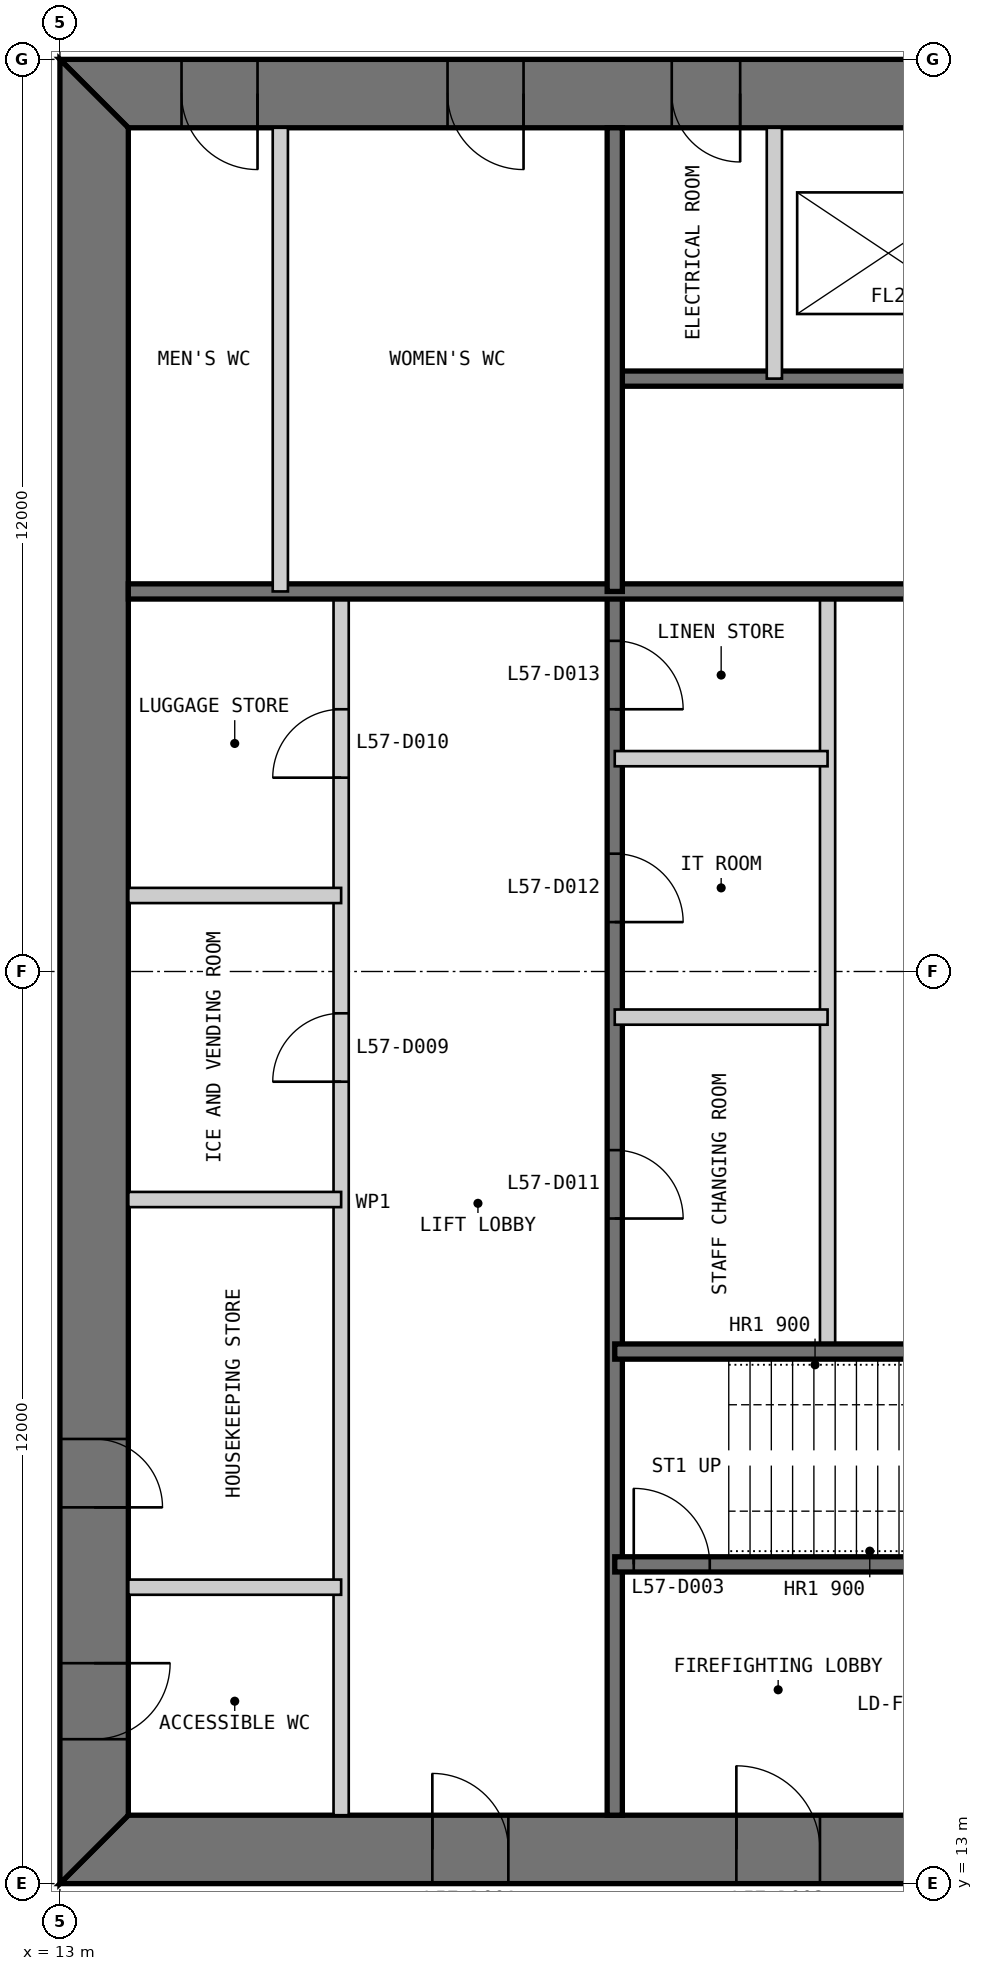
"""IFC4 building model, lengths in metres.
Left out: names, types, materials, properties, quantities, classifications, styles, units other than length and angle.
Written with IfcOpenShell. Run it as: python <this file> out.ifc"""

import sys

from ifc_helpers import new_model, si_unit, direction, frame, frame_2d, origin, place, context, subcontext, project, spatial, polyline, rectangle, outline, extrude, element, fill, save


model = new_model("IFC4")
c1 = context("Model", 3, precision=1e-05, world=origin(), true_north=direction((0.0, 1.0)))
c2 = subcontext(c1, "Body", "Model", "MODEL_VIEW")
j1 = project(units=[si_unit("LENGTHUNIT", "METRE"), si_unit("PLANEANGLEUNIT", "RADIAN")], contexts=[c1])
p1 = place(None, origin())
s1 = spatial("IfcSite", under=j1, at=p1, CompositionType="ELEMENT")
p2 = place(p1, origin())
s2 = spatial("IfcBuilding", under=s1, at=p2, CompositionType="ELEMENT")
p3 = place(p2, frame((0.0, 0.0, 245.8)))
s3 = spatial("IfcBuildingStorey", under=s2, at=p3, CompositionType="ELEMENT", Elevation=245.8)
p4 = place(p3, frame((13.0, 13.45, 0.0), z_axis=(0.0, 0.0, 1.0), x_axis=(1.0, 0.0, 0.0)))
e1 = element("IfcWall", 1, at=p4, inside=s3, PredefinedType="SHEAR", context=c2, shape_type="SweptSolid", body=[
    extrude(outline(polyline([(0.0, -0.45), (24.0, -0.45), (23.1, 0.45), (0.9, 0.45), (0.0, -0.45)])), origin(), (0.0, 0.0, 1.0), 3.4),
])
p5 = place(p4, frame((4.9, 0.0, 0.0)))
e2 = element("IfcOpeningElement", 2, at=p5, cuts=e1, PredefinedType="OPENING", context=c2, shape_type="SweptSolid", body=[
    extrude(rectangle(XDim=1.0, YDim=2.2, at=frame_2d((0.5, 1.1))), frame((0.0, 0.46, 0.0), z_axis=(0.0, -1.0, 0.0), x_axis=(1.0, 0.0, 0.0)), (0.0, 0.0, 1.0), 0.92),
])
p6 = place(p4, frame((8.9, 0.0, 0.0)))
e3 = element("IfcOpeningElement", 3, at=p6, cuts=e1, PredefinedType="OPENING", context=c2, shape_type="SweptSolid", body=[
    extrude(rectangle(XDim=1.1, YDim=2.2, at=frame_2d((0.55, 1.1))), frame((0.0, 0.46, 0.0), z_axis=(0.0, -1.0, 0.0), x_axis=(1.0, 0.0, 0.0)), (0.0, 0.0, 1.0), 0.92),
])
p7 = place(p4, frame((15.05, 0.0, 0.0)))
e4 = element("IfcOpeningElement", 4, at=p7, cuts=e1, PredefinedType="OPENING", context=c2, shape_type="SweptSolid", body=[
    extrude(rectangle(XDim=0.9, YDim=2.2, at=frame_2d((0.45, 1.1))), frame((0.0, 0.46, 0.0), z_axis=(0.0, -1.0, 0.0), x_axis=(1.0, 0.0, 0.0)), (0.0, 0.0, 1.0), 0.92),
])
p8 = place(p4, frame((17.9, 0.0, 0.0)))
e5 = element("IfcOpeningElement", 5, at=p8, cuts=e1, PredefinedType="OPENING", context=c2, shape_type="SweptSolid", body=[
    extrude(rectangle(XDim=1.0, YDim=2.2, at=frame_2d((0.5, 1.1))), frame((0.0, 0.46, 0.0), z_axis=(0.0, -1.0, 0.0), x_axis=(1.0, 0.0, 0.0)), (0.0, 0.0, 1.0), 0.92),
])
p9 = place(p4, frame((21.4, 0.0, 0.0)))
e6 = element("IfcOpeningElement", 6, at=p9, cuts=e1, PredefinedType="OPENING", context=c2, shape_type="SweptSolid", body=[
    extrude(rectangle(XDim=1.0, YDim=2.2, at=frame_2d((0.5, 1.1))), frame((0.0, 0.46, 0.0), z_axis=(0.0, -1.0, 0.0), x_axis=(1.0, 0.0, 0.0)), (0.0, 0.0, 1.0), 0.92),
])
p10 = place(p3, frame((37.0, 36.55, 0.0), z_axis=(0.0, 0.0, 1.0), x_axis=(-1.0, 0.0, 0.0)))
e7 = element("IfcWall", 7, at=p10, inside=s3, PredefinedType="SHEAR", context=c2, shape_type="SweptSolid", body=[
    extrude(outline(polyline([(0.0, -0.45), (24.0, -0.45), (23.1, 0.45), (0.9, 0.45), (0.0, -0.45)])), origin(), (0.0, 0.0, 1.0), 3.4),
])
p11 = place(p10, frame((4.9, 0.0, 0.0)))
e8 = element("IfcOpeningElement", 8, at=p11, cuts=e7, PredefinedType="OPENING", context=c2, shape_type="SweptSolid", body=[
    extrude(rectangle(XDim=1.0, YDim=2.2, at=frame_2d((0.5, 1.1))), frame((0.0, 0.46, 0.0), z_axis=(0.0, -1.0, 0.0), x_axis=(1.0, 0.0, 0.0)), (0.0, 0.0, 1.0), 0.92),
])
p12 = place(p10, frame((8.9, 0.0, 0.0)))
e9 = element("IfcOpeningElement", 9, at=p12, cuts=e7, PredefinedType="OPENING", context=c2, shape_type="SweptSolid", body=[
    extrude(rectangle(XDim=1.1, YDim=2.2, at=frame_2d((0.55, 1.1))), frame((0.0, 0.46, 0.0), z_axis=(0.0, -1.0, 0.0), x_axis=(1.0, 0.0, 0.0)), (0.0, 0.0, 1.0), 0.92),
])
p13 = place(p10, frame((15.05, 0.0, 0.0)))
e10 = element("IfcOpeningElement", 10, at=p13, cuts=e7, PredefinedType="OPENING", context=c2, shape_type="SweptSolid", body=[
    extrude(rectangle(XDim=0.9, YDim=2.2, at=frame_2d((0.45, 1.1))), frame((0.0, 0.46, 0.0), z_axis=(0.0, -1.0, 0.0), x_axis=(1.0, 0.0, 0.0)), (0.0, 0.0, 1.0), 0.92),
])
p14 = place(p10, frame((17.9, 0.0, 0.0)))
e11 = element("IfcOpeningElement", 11, at=p14, cuts=e7, PredefinedType="OPENING", context=c2, shape_type="SweptSolid", body=[
    extrude(rectangle(XDim=1.0, YDim=2.2, at=frame_2d((0.5, 1.1))), frame((0.0, 0.46, 0.0), z_axis=(0.0, -1.0, 0.0), x_axis=(1.0, 0.0, 0.0)), (0.0, 0.0, 1.0), 0.92),
])
p15 = place(p10, frame((21.4, 0.0, 0.0)))
e12 = element("IfcOpeningElement", 12, at=p15, cuts=e7, PredefinedType="OPENING", context=c2, shape_type="SweptSolid", body=[
    extrude(rectangle(XDim=1.0, YDim=2.2, at=frame_2d((0.5, 1.1))), frame((0.0, 0.46, 0.0), z_axis=(0.0, -1.0, 0.0), x_axis=(1.0, 0.0, 0.0)), (0.0, 0.0, 1.0), 0.92),
])
p16 = place(p3, frame((13.45, 36.1, 0.0), z_axis=(0.0, 0.0, 1.0), x_axis=(0.0, -1.0, 0.0)))
e13 = element("IfcWall", 13, at=p16, inside=s3, PredefinedType="SHEAR", context=c2, shape_type="SweptSolid", body=[
    extrude(outline(polyline([(-0.9, -0.45), (23.1, -0.45), (22.2, 0.45), (0.0, 0.45), (-0.9, -0.45)])), origin(), (0.0, 0.0, 1.0), 3.4),
])
p17 = place(p16, frame((20.2, 0.0, 0.0)))
e14 = element("IfcOpeningElement", 14, at=p17, cuts=e13, PredefinedType="OPENING", context=c2, shape_type="SweptSolid", body=[
    extrude(rectangle(XDim=1.0, YDim=2.2, at=frame_2d((0.5, 1.1))), frame((0.0, 0.46, 0.0), z_axis=(0.0, -1.0, 0.0), x_axis=(1.0, 0.0, 0.0)), (0.0, 0.0, 1.0), 0.92),
])
p18 = place(p16, frame((17.25, 0.0, 0.0)))
e15 = element("IfcOpeningElement", 15, at=p18, cuts=e13, PredefinedType="OPENING", context=c2, shape_type="SweptSolid", body=[
    extrude(rectangle(XDim=0.9, YDim=2.2, at=frame_2d((0.45, 1.1))), frame((0.0, 0.46, 0.0), z_axis=(0.0, -1.0, 0.0), x_axis=(1.0, 0.0, 0.0)), (0.0, 0.0, 1.0), 0.92),
])
p19 = place(p3, frame((16.7, 13.9, 0.0), z_axis=(0.0, 0.0, 1.0), x_axis=(0.0, 1.0, 0.0)))
e16 = element("IfcWall", 16, at=p19, inside=s3, PredefinedType="PARTITIONING", context=c2, shape_type="SweptSolid", body=[
    extrude(rectangle(XDim=16.1, YDim=0.2, at=frame_2d((8.05, 0.0))), origin(), (0.0, 0.0, 1.0), 3.2),
])
p20 = place(p19, frame((9.65, 0.0, 0.0)))
e17 = element("IfcOpeningElement", 17, at=p20, cuts=e16, PredefinedType="OPENING", context=c2, shape_type="SweptSolid", body=[
    extrude(rectangle(XDim=0.9, YDim=2.2, at=frame_2d((0.45, 1.1))), frame((0.0, 0.11, 0.0), z_axis=(0.0, -1.0, 0.0), x_axis=(1.0, 0.0, 0.0)), (0.0, 0.0, 1.0), 0.22),
])
p21 = place(p19, frame((13.65, 0.0, 0.0)))
e18 = element("IfcOpeningElement", 18, at=p21, cuts=e16, PredefinedType="OPENING", context=c2, shape_type="SweptSolid", body=[
    extrude(rectangle(XDim=0.9, YDim=2.2, at=frame_2d((0.45, 1.1))), frame((0.0, 0.11, 0.0), z_axis=(0.0, -1.0, 0.0), x_axis=(1.0, 0.0, 0.0)), (0.0, 0.0, 1.0), 0.22),
])
p22 = place(p3, frame((20.3, 13.9, 0.0), z_axis=(0.0, 0.0, 1.0), x_axis=(0.0, 1.0, 0.0)))
e19 = element("IfcWall", 19, at=p22, inside=s3, PredefinedType="SOLIDWALL", context=c2, shape_type="SweptSolid", body=[
    extrude(rectangle(XDim=16.1, YDim=0.2, at=frame_2d((8.05, 0.0))), origin(), (0.0, 0.0, 1.0), 3.2),
])
p23 = place(p22, frame((7.85, 0.0, 0.0)))
e20 = element("IfcOpeningElement", 20, at=p23, cuts=e19, PredefinedType="OPENING", context=c2, shape_type="SweptSolid", body=[
    extrude(rectangle(XDim=0.9, YDim=2.2, at=frame_2d((0.45, 1.1))), frame((0.0, 0.11, 0.0), z_axis=(0.0, -1.0, 0.0), x_axis=(1.0, 0.0, 0.0)), (0.0, 0.0, 1.0), 0.22),
])
p24 = place(p22, frame((11.75, 0.0, 0.0)))
e21 = element("IfcOpeningElement", 21, at=p24, cuts=e19, PredefinedType="OPENING", context=c2, shape_type="SweptSolid", body=[
    extrude(rectangle(XDim=0.9, YDim=2.2, at=frame_2d((0.45, 1.1))), frame((0.0, 0.11, 0.0), z_axis=(0.0, -1.0, 0.0), x_axis=(1.0, 0.0, 0.0)), (0.0, 0.0, 1.0), 0.22),
])
p25 = place(p22, frame((14.55, 0.0, 0.0)))
e22 = element("IfcOpeningElement", 22, at=p25, cuts=e19, PredefinedType="OPENING", context=c2, shape_type="SweptSolid", body=[
    extrude(rectangle(XDim=0.9, YDim=2.2, at=frame_2d((0.45, 1.1))), frame((0.0, 0.11, 0.0), z_axis=(0.0, -1.0, 0.0), x_axis=(1.0, 0.0, 0.0)), (0.0, 0.0, 1.0), 0.22),
])
p26 = place(p3, frame((23.1, 20.0, 0.0), z_axis=(0.0, 0.0, 1.0), x_axis=(0.0, 1.0, 0.0)))
e23 = element("IfcWall", 23, at=p26, inside=s3, PredefinedType="PARTITIONING", context=c2, shape_type="SweptSolid", body=[
    extrude(rectangle(XDim=10.0, YDim=0.2, at=frame_2d((5.0, 0.0))), origin(), (0.0, 0.0, 1.0), 3.2),
])
p27 = place(p3, frame((20.3, 17.2, 0.0), z_axis=(0.0, 0.0, 1.0), x_axis=(1.0, 0.0, 0.0)))
e24 = element("IfcWall", 24, at=p27, inside=s3, PredefinedType="SOLIDWALL", context=c2, shape_type="SweptSolid", body=[
    extrude(rectangle(XDim=9.4, YDim=0.2, at=frame_2d((4.7, 0.0))), origin(), (0.0, 0.0, 1.0), 3.2),
])
p28 = place(p27, frame((0.25, 0.0, 0.0)))
e25 = element("IfcOpeningElement", 25, at=p28, cuts=e24, PredefinedType="OPENING", context=c2, shape_type="SweptSolid", body=[
    extrude(rectangle(XDim=1.0, YDim=2.2, at=frame_2d((0.5, 1.1))), frame((0.0, 0.11, 0.0), z_axis=(0.0, -1.0, 0.0), x_axis=(1.0, 0.0, 0.0)), (0.0, 0.0, 1.0), 0.22),
])
p29 = place(p3, frame((20.3, 20.0, 0.0), z_axis=(0.0, 0.0, 1.0), x_axis=(1.0, 0.0, 0.0)))
e26 = element("IfcWall", 26, at=p29, inside=s3, PredefinedType="SOLIDWALL", context=c2, shape_type="SweptSolid", body=[
    extrude(rectangle(XDim=15.8, YDim=0.2, at=frame_2d((7.9, 0.0))), origin(), (0.0, 0.0, 1.0), 3.2),
])
for number, where, z_axis, x_axis in (
    (27, (13.9, 16.9, 0.0), (0.0, 0.0, 1.0), (1.0, 0.0, 0.0)),
    (28, (13.9, 22.0, 0.0), (0.0, 0.0, 1.0), (1.0, 0.0, 0.0)),
    (29, (13.9, 26.0, 0.0), (0.0, 0.0, 1.0), (1.0, 0.0, 0.0)),
    (30, (20.3, 24.4, 0.0), (0.0, 0.0, 1.0), (1.0, 0.0, 0.0)),
    (31, (20.3, 27.8, 0.0), (0.0, 0.0, 1.0), (1.0, 0.0, 0.0)),
):
    element("IfcWall", number, at=place(p3, frame(where, z_axis=z_axis, x_axis=x_axis)), inside=s3, PredefinedType="PARTITIONING", context=c2, shape_type="SweptSolid", body=[
        extrude(rectangle(XDim=2.8, YDim=0.2, at=frame_2d((1.4, 0.0))), origin(), (0.0, 0.0, 1.0), 3.2),
    ])
p30 = place(p3, frame((29.7, 32.8, 0.0), z_axis=(0.0, 0.0, 1.0), x_axis=(-1.0, 0.0, 0.0)))
e32 = element("IfcWall", 32, at=p30, inside=s3, PredefinedType="SOLIDWALL", context=c2, shape_type="SweptSolid", body=[
    extrude(rectangle(XDim=9.4, YDim=0.2, at=frame_2d((4.7, 0.0))), origin(), (0.0, 0.0, 1.0), 3.2),
])
p31 = place(p30, frame((0.25, 0.0, 0.0)))
e33 = element("IfcOpeningElement", 33, at=p31, cuts=e32, PredefinedType="OPENING", context=c2, shape_type="SweptSolid", body=[
    extrude(rectangle(XDim=1.0, YDim=2.2, at=frame_2d((0.5, 1.1))), frame((0.0, 0.11, 0.0), z_axis=(0.0, -1.0, 0.0), x_axis=(1.0, 0.0, 0.0)), (0.0, 0.0, 1.0), 0.22),
])
p32 = place(p3, frame((29.7, 30.0, 0.0), z_axis=(0.0, 0.0, 1.0), x_axis=(-1.0, 0.0, 0.0)))
e34 = element("IfcWall", 34, at=p32, inside=s3, PredefinedType="SOLIDWALL", context=c2, shape_type="SweptSolid", body=[
    extrude(rectangle(XDim=15.8, YDim=0.2, at=frame_2d((7.9, 0.0))), origin(), (0.0, 0.0, 1.0), 3.2),
])
p33 = place(p3, frame((22.4, 36.1, 0.0), z_axis=(0.0, 0.0, 1.0), x_axis=(0.0, -1.0, 0.0)))
e35 = element("IfcWall", 35, at=p33, inside=s3, PredefinedType="PARTITIONING", context=c2, shape_type="SweptSolid", body=[
    extrude(rectangle(XDim=3.3, YDim=0.2, at=frame_2d((1.65, 0.0))), origin(), (0.0, 0.0, 1.0), 3.2),
])
p34 = place(p3, frame((20.3, 36.1, 0.0), z_axis=(0.0, 0.0, 1.0), x_axis=(0.0, -1.0, 0.0)))
e36 = element("IfcWall", 36, at=p34, inside=s3, PredefinedType="SOLIDWALL", context=c2, shape_type="SweptSolid", body=[
    extrude(rectangle(XDim=6.1, YDim=0.2, at=frame_2d((3.05, 0.0))), origin(), (0.0, 0.0, 1.0), 3.2),
])
p35 = place(p3, frame((15.9, 36.1, 0.0), z_axis=(0.0, 0.0, 1.0), x_axis=(0.0, -1.0, 0.0)))
e37 = element("IfcWall", 37, at=p35, inside=s3, PredefinedType="PARTITIONING", context=c2, shape_type="SweptSolid", body=[
    extrude(rectangle(XDim=6.1, YDim=0.2, at=frame_2d((3.05, 0.0))), origin(), (0.0, 0.0, 1.0), 3.2),
])
p36 = place(p5, origin())
e38 = element("IfcDoor", 38, at=p36, inside=s3, OperationType="SINGLE_SWING_LEFT", PredefinedType="DOOR", context=c2, shape_type="SweptSolid", body=[
    extrude(rectangle(XDim=1.0, YDim=2.2, at=frame_2d((0.5, 1.1))), frame((0.0, 0.025, 0.0), z_axis=(0.0, -1.0, 0.0), x_axis=(1.0, 0.0, 0.0)), (0.0, 0.0, 1.0), 0.05),
    extrude(outline(polyline([(0.0, 0.0), (0.04, 0.0), (0.04, 2.16), (0.96, 2.16), (0.96, 0.0), (1.0, 0.0), (1.0, 2.2), (0.0, 2.2), (0.0, 0.0)])), frame((0.0, 0.3, 0.0), z_axis=(0.0, -1.0, 0.0), x_axis=(1.0, 0.0, 0.0)), (0.0, 0.0, 1.0), 0.6),
])
fill(e2, e38)
p37 = place(p6, origin())
e39 = element("IfcDoor", 39, at=p37, inside=s3, OperationType="SINGLE_SWING_LEFT", PredefinedType="DOOR", context=c2, shape_type="SweptSolid", body=[
    extrude(rectangle(XDim=1.1, YDim=2.2, at=frame_2d((0.55, 1.1))), frame((0.0, 0.025, 0.0), z_axis=(0.0, -1.0, 0.0), x_axis=(1.0, 0.0, 0.0)), (0.0, 0.0, 1.0), 0.05),
    extrude(outline(polyline([(0.0, 0.0), (0.04, 0.0), (0.04, 2.16), (1.06, 2.16), (1.06, 0.0), (1.1, 0.0), (1.1, 2.2), (0.0, 2.2), (0.0, 0.0)])), frame((0.0, 0.3, 0.0), z_axis=(0.0, -1.0, 0.0), x_axis=(1.0, 0.0, 0.0)), (0.0, 0.0, 1.0), 0.6),
])
fill(e3, e39)
p38 = place(p28, origin())
e40 = element("IfcDoor", 40, at=p38, inside=s3, OperationType="SINGLE_SWING_LEFT", PredefinedType="DOOR", context=c2, shape_type="SweptSolid", body=[
    extrude(rectangle(XDim=1.0, YDim=2.2, at=frame_2d((0.5, 1.1))), frame((0.0, 0.025, 0.0), z_axis=(0.0, -1.0, 0.0), x_axis=(1.0, 0.0, 0.0)), (0.0, 0.0, 1.0), 0.05),
])
fill(e25, e40)
p39 = place(p17, origin())
e41 = element("IfcDoor", 41, at=p39, inside=s3, OperationType="SINGLE_SWING_LEFT", PredefinedType="DOOR", context=c2, shape_type="SweptSolid", body=[
    extrude(rectangle(XDim=1.0, YDim=2.2, at=frame_2d((0.5, 1.1))), frame((0.0, 0.025, 0.0), z_axis=(0.0, -1.0, 0.0), x_axis=(1.0, 0.0, 0.0)), (0.0, 0.0, 1.0), 0.05),
    extrude(outline(polyline([(0.0, 0.0), (0.04, 0.0), (0.04, 2.16), (0.96, 2.16), (0.96, 0.0), (1.0, 0.0), (1.0, 2.2), (0.0, 2.2), (0.0, 0.0)])), frame((0.0, 0.3, 0.0), z_axis=(0.0, -1.0, 0.0), x_axis=(1.0, 0.0, 0.0)), (0.0, 0.0, 1.0), 0.6),
])
fill(e14, e41)
p40 = place(p18, origin())
e42 = element("IfcDoor", 42, at=p40, inside=s3, OperationType="SINGLE_SWING_RIGHT", PredefinedType="DOOR", context=c2, shape_type="SweptSolid", body=[
    extrude(rectangle(XDim=0.9, YDim=2.2, at=frame_2d((0.45, 1.1))), frame((0.0, 0.025, 0.0), z_axis=(0.0, -1.0, 0.0), x_axis=(1.0, 0.0, 0.0)), (0.0, 0.0, 1.0), 0.05),
    extrude(outline(polyline([(0.0, 0.0), (0.04, 0.0), (0.04, 2.16), (0.86, 2.16), (0.86, 0.0), (0.9, 0.0), (0.9, 2.2), (0.0, 2.2), (0.0, 0.0)])), frame((0.0, 0.3, 0.0), z_axis=(0.0, -1.0, 0.0), x_axis=(1.0, 0.0, 0.0)), (0.0, 0.0, 1.0), 0.6),
])
fill(e15, e42)
p41 = place(p20, origin())
e43 = element("IfcDoor", 43, at=p41, inside=s3, OperationType="SINGLE_SWING_LEFT", PredefinedType="DOOR", context=c2, shape_type="SweptSolid", body=[
    extrude(rectangle(XDim=0.9, YDim=2.2, at=frame_2d((0.45, 1.1))), frame((0.0, 0.025, 0.0), z_axis=(0.0, -1.0, 0.0), x_axis=(1.0, 0.0, 0.0)), (0.0, 0.0, 1.0), 0.05),
])
fill(e17, e43)
p42 = place(p21, origin())
e44 = element("IfcDoor", 44, at=p42, inside=s3, OperationType="SINGLE_SWING_LEFT", PredefinedType="DOOR", context=c2, shape_type="SweptSolid", body=[
    extrude(rectangle(XDim=0.9, YDim=2.2, at=frame_2d((0.45, 1.1))), frame((0.0, 0.025, 0.0), z_axis=(0.0, -1.0, 0.0), x_axis=(1.0, 0.0, 0.0)), (0.0, 0.0, 1.0), 0.05),
])
fill(e18, e44)
p43 = place(p23, frame((0.9, 0.0, 0.0), z_axis=(0.0, 0.0, 1.0), x_axis=(-1.0, 0.0, 0.0)))
e45 = element("IfcDoor", 45, at=p43, inside=s3, OperationType="SINGLE_SWING_RIGHT", PredefinedType="DOOR", context=c2, shape_type="SweptSolid", body=[
    extrude(rectangle(XDim=0.9, YDim=2.2, at=frame_2d((0.45, 1.1))), frame((0.0, 0.025, 0.0), z_axis=(0.0, -1.0, 0.0), x_axis=(1.0, 0.0, 0.0)), (0.0, 0.0, 1.0), 0.05),
])
fill(e20, e45)
p44 = place(p24, frame((0.9, 0.0, 0.0), z_axis=(0.0, 0.0, 1.0), x_axis=(-1.0, 0.0, 0.0)))
e46 = element("IfcDoor", 46, at=p44, inside=s3, OperationType="SINGLE_SWING_RIGHT", PredefinedType="DOOR", context=c2, shape_type="SweptSolid", body=[
    extrude(rectangle(XDim=0.9, YDim=2.2, at=frame_2d((0.45, 1.1))), frame((0.0, 0.025, 0.0), z_axis=(0.0, -1.0, 0.0), x_axis=(1.0, 0.0, 0.0)), (0.0, 0.0, 1.0), 0.05),
])
fill(e21, e46)
p45 = place(p25, frame((0.9, 0.0, 0.0), z_axis=(0.0, 0.0, 1.0), x_axis=(-1.0, 0.0, 0.0)))
e47 = element("IfcDoor", 47, at=p45, inside=s3, OperationType="SINGLE_SWING_RIGHT", PredefinedType="DOOR", context=c2, shape_type="SweptSolid", body=[
    extrude(rectangle(XDim=0.9, YDim=2.2, at=frame_2d((0.45, 1.1))), frame((0.0, 0.025, 0.0), z_axis=(0.0, -1.0, 0.0), x_axis=(1.0, 0.0, 0.0)), (0.0, 0.0, 1.0), 0.05),
])
fill(e22, e47)
p46 = place(p13, origin())
e48 = element("IfcDoor", 48, at=p46, inside=s3, OperationType="SINGLE_SWING_LEFT", PredefinedType="DOOR", context=c2, shape_type="SweptSolid", body=[
    extrude(rectangle(XDim=0.9, YDim=2.2, at=frame_2d((0.45, 1.1))), frame((0.0, 0.025, 0.0), z_axis=(0.0, -1.0, 0.0), x_axis=(1.0, 0.0, 0.0)), (0.0, 0.0, 1.0), 0.05),
    extrude(outline(polyline([(0.0, 0.0), (0.04, 0.0), (0.04, 2.16), (0.86, 2.16), (0.86, 0.0), (0.9, 0.0), (0.9, 2.2), (0.0, 2.2), (0.0, 0.0)])), frame((0.0, 0.3, 0.0), z_axis=(0.0, -1.0, 0.0), x_axis=(1.0, 0.0, 0.0)), (0.0, 0.0, 1.0), 0.6),
])
fill(e10, e48)
p47 = place(p14, origin())
e49 = element("IfcDoor", 49, at=p47, inside=s3, OperationType="SINGLE_SWING_LEFT", PredefinedType="DOOR", context=c2, shape_type="SweptSolid", body=[
    extrude(rectangle(XDim=1.0, YDim=2.2, at=frame_2d((0.5, 1.1))), frame((0.0, 0.025, 0.0), z_axis=(0.0, -1.0, 0.0), x_axis=(1.0, 0.0, 0.0)), (0.0, 0.0, 1.0), 0.05),
    extrude(outline(polyline([(0.0, 0.0), (0.04, 0.0), (0.04, 2.16), (0.96, 2.16), (0.96, 0.0), (1.0, 0.0), (1.0, 2.2), (0.0, 2.2), (0.0, 0.0)])), frame((0.0, 0.3, 0.0), z_axis=(0.0, -1.0, 0.0), x_axis=(1.0, 0.0, 0.0)), (0.0, 0.0, 1.0), 0.6),
])
fill(e11, e49)
p48 = place(p15, origin())
e50 = element("IfcDoor", 50, at=p48, inside=s3, OperationType="SINGLE_SWING_LEFT", PredefinedType="DOOR", context=c2, shape_type="SweptSolid", body=[
    extrude(rectangle(XDim=1.0, YDim=2.2, at=frame_2d((0.5, 1.1))), frame((0.0, 0.025, 0.0), z_axis=(0.0, -1.0, 0.0), x_axis=(1.0, 0.0, 0.0)), (0.0, 0.0, 1.0), 0.05),
    extrude(outline(polyline([(0.0, 0.0), (0.04, 0.0), (0.04, 2.16), (0.96, 2.16), (0.96, 0.0), (1.0, 0.0), (1.0, 2.2), (0.0, 2.2), (0.0, 0.0)])), frame((0.0, 0.3, 0.0), z_axis=(0.0, -1.0, 0.0), x_axis=(1.0, 0.0, 0.0)), (0.0, 0.0, 1.0), 0.6),
])
fill(e12, e50)
save(model, sys.argv[1])
